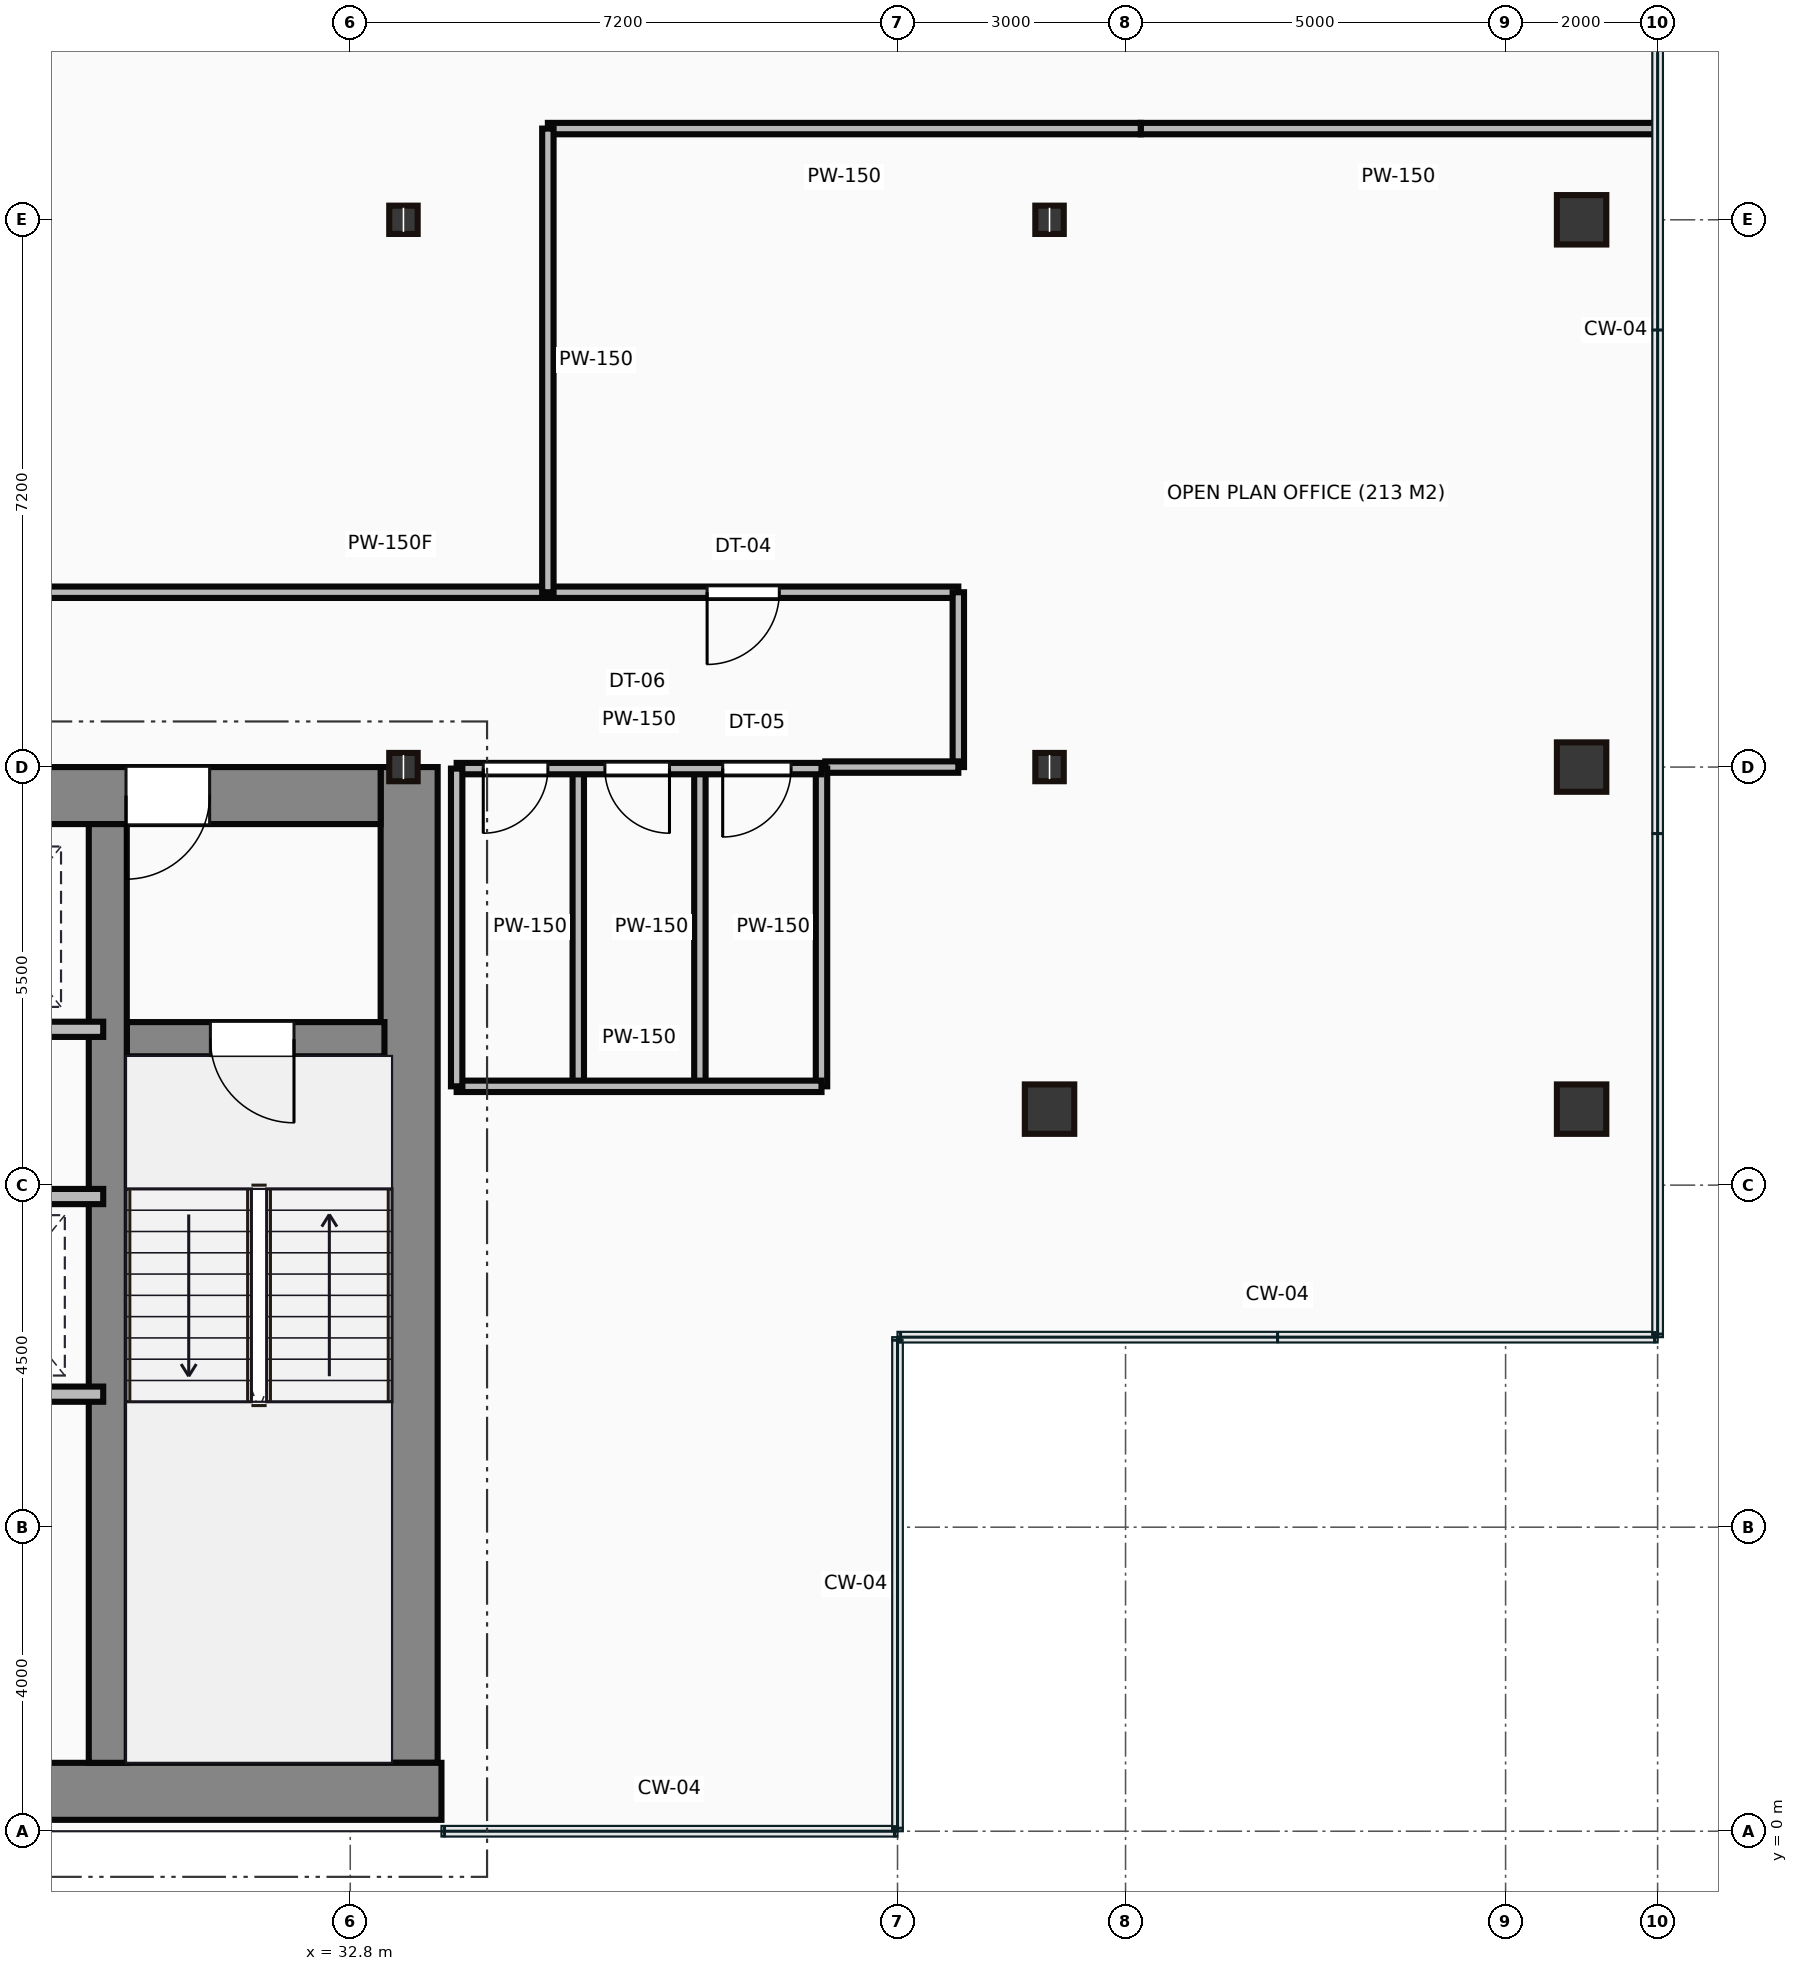
"""IFC4 building model, lengths in metres.
Left out: names, types, materials, properties, quantities, classifications, styles, units other than length and angle.
Written with IfcOpenShell. Run it as: python <this file> out.ifc"""

import sys

from ifc_helpers import new_model, si_unit, direction, frame, frame_2d, origin, origin_2d, place, context, subcontext, project, spatial, rectangle, hollow_rectangle, i_section, extrude, source, transform, mapped, element, fill, save


model = new_model("IFC4")
c1 = context("Model", 3, precision=1e-05, world=origin(), true_north=direction((0.0, 1.0)))
c2 = subcontext(c1, "Body", "Model", "MODEL_VIEW")
j1 = project(units=[si_unit("LENGTHUNIT", "METRE"), si_unit("PLANEANGLEUNIT", "RADIAN")], contexts=[c1])
p1 = place(None, origin())
s1 = spatial("IfcSite", under=j1, at=p1, CompositionType="ELEMENT")
p2 = place(p1, origin())
s2 = spatial("IfcBuilding", under=s1, at=p2, CompositionType="ELEMENT")
p3 = place(p2, frame((0.0, 0.0, 177.1)))
s3 = spatial("IfcBuildingStorey", under=s2, at=p3, CompositionType="ELEMENT", Elevation=177.1)
m1 = source(origin(), c2, "Body", "SweptSolid", [
    extrude(rectangle(XDim=29.5, YDim=0.75, at=frame_2d((14.75, 0.0))), origin(), (0.0, 0.0, 1.0), 3.65),
])
p4 = place(p3, frame((4.5, 0.525, 0.0), z_axis=(0.0, 0.0, 1.0), x_axis=(1.0, 0.0, 0.0)))
e1 = element("IfcWall", 1, at=p4, inside=s3, PredefinedType="SHEAR", context=c2, shape_type="MappedRepresentation", body=[
    mapped(m1, transform((0.0, 0.0, 0.0))),
])
m2 = source(origin(), c2, "Body", "SweptSolid", [
    extrude(rectangle(XDim=13.1, YDim=0.75, at=frame_2d((6.55, 0.0))), origin(), (0.0, 0.0, 1.0), 3.65),
])
p5 = place(p3, frame((33.575, 0.9, 0.0), z_axis=(0.0, 0.0, 1.0), x_axis=(0.0, 1.0, 0.0)))
e2 = element("IfcWall", 2, at=p5, inside=s3, PredefinedType="SHEAR", context=c2, shape_type="MappedRepresentation", body=[
    mapped(m2, transform((0.0, 0.0, 0.0))),
])
m3 = source(origin(), c2, "Body", "SweptSolid", [
    extrude(rectangle(XDim=12.6, YDim=0.75, at=frame_2d((6.3, 0.0))), origin(), (0.0, 0.0, 1.0), 3.65),
])
p6 = place(p3, frame((20.6, 13.625, 0.0), z_axis=(0.0, 0.0, 1.0), x_axis=(1.0, 0.0, 0.0)))
e3 = element("IfcWall", 3, at=p6, inside=s3, PredefinedType="SHEAR", context=c2, shape_type="MappedRepresentation", body=[
    mapped(m3, transform((0.0, 0.0, 0.0))),
])
p7 = place(p6, frame((9.25, 0.0, 0.0)))
e4 = element("IfcOpeningElement", 4, at=p7, cuts=e3, PredefinedType="OPENING", context=c2, shape_type="SweptSolid", body=[
    extrude(rectangle(XDim=1.1, YDim=2.15, at=frame_2d((0.55, 1.075))), frame((0.0, 0.385, 0.0), z_axis=(0.0, -1.0, 0.0), x_axis=(1.0, 0.0, 0.0)), (0.0, 0.0, 1.0), 0.77),
])
m4 = source(origin(), c2, "Body", "SweptSolid", [
    extrude(rectangle(XDim=12.35, YDim=0.5, at=frame_2d((6.175, 0.0))), origin(), (0.0, 0.0, 1.0), 3.65),
])
p8 = place(p3, frame((29.61, 0.9, 0.0), z_axis=(0.0, 0.0, 1.0), x_axis=(0.0, 1.0, 0.0)))
e5 = element("IfcWall", 5, at=p8, inside=s3, PredefinedType="SHEAR", context=c2, shape_type="MappedRepresentation", body=[
    mapped(m4, transform((0.0, 0.0, 0.0))),
])
m5 = source(origin(), c2, "Body", "SweptSolid", [
    extrude(rectangle(XDim=3.39, YDim=0.45, at=frame_2d((1.695, 0.0))), origin(), (0.0, 0.0, 1.0), 3.65),
])
p9 = place(p3, frame((29.86, 10.42, 0.0), z_axis=(0.0, 0.0, 1.0), x_axis=(1.0, 0.0, 0.0)))
e6 = element("IfcWall", 6, at=p9, inside=s3, PredefinedType="SHEAR", context=c2, shape_type="MappedRepresentation", body=[
    mapped(m5, transform((0.0, 0.0, 0.0))),
])
p10 = place(p9, frame((1.1, 0.0, 0.0)))
e7 = element("IfcOpeningElement", 7, at=p10, cuts=e6, PredefinedType="OPENING", context=c2, shape_type="SweptSolid", body=[
    extrude(rectangle(XDim=1.1, YDim=2.15, at=frame_2d((0.55, 1.075))), frame((0.0, 0.235, 0.0), z_axis=(0.0, -1.0, 0.0), x_axis=(1.0, 0.0, 0.0)), (0.0, 0.0, 1.0), 0.47),
])
m6 = source(origin(), c2, "Body", "SweptSolid", [
    extrude(i_section(OverallWidth=0.374, OverallDepth=0.372, WebThickness=0.016, FlangeThickness=0.026, at=origin_2d()), origin(), (0.0, 0.0, 1.0), 3.65),
])
for number, where, z_axis, x_axis in (
    (8, (33.5, 14.0, 0.0), (0.0, 0.0, 1.0), (1.0, 0.0, 0.0)),
    (9, (33.5, 21.2, 0.0), (0.0, 0.0, 1.0), (1.0, 0.0, 0.0)),
):
    element("IfcColumn", number, at=place(p3, frame(where, z_axis=z_axis, x_axis=x_axis)), inside=s3, PredefinedType="COLUMN", context=c2, shape_type="MappedRepresentation", body=[
        mapped(m6, transform((0.0, 0.0, 0.0))),
    ])
m7 = source(origin(), c2, "Body", "SweptSolid", [
    extrude(hollow_rectangle(XDim=0.65, YDim=0.65, WallThickness=0.032, at=origin_2d()), origin(), (0.0, 0.0, 1.0), 3.65),
])
p11 = place(p3, frame((42.0, 9.5, 0.0), z_axis=(0.0, 0.0, 1.0), x_axis=(1.0, 0.0, 0.0)))
e10 = element("IfcColumn", 10, at=p11, inside=s3, PredefinedType="COLUMN", context=c2, shape_type="MappedRepresentation", body=[
    mapped(m7, transform((0.0, 0.0, 0.0))),
])
for number, where, z_axis, x_axis in (
    (11, (42.0, 14.0, 0.0), (0.0, 0.0, 1.0), (1.0, 0.0, 0.0)),
    (12, (42.0, 21.2, 0.0), (0.0, 0.0, 1.0), (1.0, 0.0, 0.0)),
):
    element("IfcColumn", number, at=place(p3, frame(where, z_axis=z_axis, x_axis=x_axis)), inside=s3, PredefinedType="COLUMN", context=c2, shape_type="MappedRepresentation", body=[
        mapped(m6, transform((0.0, 0.0, 0.0))),
    ])
for number, where, z_axis, x_axis in (
    (13, (49.0, 9.5, 0.0), (0.0, 0.0, 1.0), (1.0, 0.0, 0.0)),
    (14, (49.0, 14.0, 0.0), (0.0, 0.0, 1.0), (1.0, 0.0, 0.0)),
    (15, (49.0, 21.2, 0.0), (0.0, 0.0, 1.0), (1.0, 0.0, 0.0)),
):
    element("IfcColumn", number, at=place(p3, frame(where, z_axis=z_axis, x_axis=x_axis)), inside=s3, PredefinedType="COLUMN", context=c2, shape_type="MappedRepresentation", body=[
        mapped(m7, transform((0.0, 0.0, 0.0))),
    ])
m8 = source(origin(), c2, "Body", "SweptSolid", [
    extrude(rectangle(XDim=8.8, YDim=0.2, at=frame_2d((4.4, 0.0))), origin(), (0.0, 0.0, 1.0), 3.4),
])
p12 = place(p3, frame((20.75, 10.55, 0.0), z_axis=(0.0, 0.0, 1.0), x_axis=(1.0, 0.0, 0.0)))
e16 = element("IfcWall", 16, at=p12, inside=s3, PredefinedType="PARTITIONING", context=c2, shape_type="MappedRepresentation", body=[
    mapped(m8, transform((0.0, 0.0, 0.0))),
])
m9 = source(origin(), c2, "Body", "SweptSolid", [
    extrude(rectangle(XDim=4.55, YDim=0.2, at=frame_2d((2.275, 0.0))), origin(), (0.0, 0.0, 1.0), 3.4),
])
for number, where, z_axis, x_axis in (
    (17, (25.0, 8.35, 0.0), (0.0, 0.0, 1.0), (1.0, 0.0, 0.0)),
    (18, (25.0, 5.75, 0.0), (0.0, 0.0, 1.0), (1.0, 0.0, 0.0)),
):
    element("IfcWall", number, at=place(p3, frame(where, z_axis=z_axis, x_axis=x_axis)), inside=s3, PredefinedType="PARTITIONING", context=c2, shape_type="MappedRepresentation", body=[
        mapped(m9, transform((0.0, 0.0, 0.0))),
    ])
m10 = source(origin(), c2, "Body", "SweptSolid", [
    extrude(rectangle(XDim=4.8, YDim=0.15, at=frame_2d((2.4, 0.0))), origin(), (0.0, 0.0, 1.0), 2.76),
])
p13 = place(p3, frame((34.2, 13.98, 0.0), z_axis=(0.0, 0.0, 1.0), x_axis=(1.0, 0.0, 0.0)))
e19 = element("IfcWall", 19, at=p13, inside=s3, PredefinedType="PARTITIONING", context=c2, shape_type="MappedRepresentation", body=[
    mapped(m10, transform((0.0, 0.0, 0.0))),
])
p14 = place(p13, frame((0.35, 0.0, 0.0)))
e20 = element("IfcOpeningElement", 20, at=p14, cuts=e19, PredefinedType="OPENING", context=c2, shape_type="SweptSolid", body=[
    extrude(rectangle(XDim=0.85, YDim=2.1, at=frame_2d((0.425, 1.05))), frame((0.0, 0.085, 0.0), z_axis=(0.0, -1.0, 0.0), x_axis=(1.0, 0.0, 0.0)), (0.0, 0.0, 1.0), 0.17),
])
p15 = place(p13, frame((1.95, 0.0, 0.0)))
e21 = element("IfcOpeningElement", 21, at=p15, cuts=e19, PredefinedType="OPENING", context=c2, shape_type="SweptSolid", body=[
    extrude(rectangle(XDim=0.85, YDim=2.1, at=frame_2d((0.425, 1.05))), frame((0.0, 0.085, 0.0), z_axis=(0.0, -1.0, 0.0), x_axis=(1.0, 0.0, 0.0)), (0.0, 0.0, 1.0), 0.17),
])
p16 = place(p13, frame((3.5, 0.0, 0.0)))
e22 = element("IfcOpeningElement", 22, at=p16, cuts=e19, PredefinedType="OPENING", context=c2, shape_type="SweptSolid", body=[
    extrude(rectangle(XDim=0.9, YDim=2.1, at=frame_2d((0.45, 1.05))), frame((0.0, 0.085, 0.0), z_axis=(0.0, -1.0, 0.0), x_axis=(1.0, 0.0, 0.0)), (0.0, 0.0, 1.0), 0.17),
])
m11 = source(origin(), c2, "Body", "SweptSolid", [
    extrude(rectangle(XDim=4.8, YDim=0.15, at=frame_2d((2.4, 0.0))), origin(), (0.0, 0.0, 1.0), 3.4),
])
p17 = place(p3, frame((34.2, 9.8, 0.0), z_axis=(0.0, 0.0, 1.0), x_axis=(1.0, 0.0, 0.0)))
e23 = element("IfcWall", 23, at=p17, inside=s3, PredefinedType="PARTITIONING", context=c2, shape_type="MappedRepresentation", body=[
    mapped(m11, transform((0.0, 0.0, 0.0))),
])
m12 = source(origin(), c2, "Body", "SweptSolid", [
    extrude(rectangle(XDim=4.18, YDim=0.15, at=frame_2d((2.09, 0.0))), origin(), (0.0, 0.0, 1.0), 3.4),
])
for number, where, z_axis, x_axis in (
    (24, (39.0, 9.8, 0.0), (0.0, 0.0, 1.0), (0.0, 1.0, 0.0)),
    (25, (34.2, 9.8, 0.0), (0.0, 0.0, 1.0), (0.0, 1.0, 0.0)),
    (26, (35.8, 9.8, 0.0), (0.0, 0.0, 1.0), (0.0, 1.0, 0.0)),
    (27, (37.4, 9.8, 0.0), (0.0, 0.0, 1.0), (0.0, 1.0, 0.0)),
):
    element("IfcWall", number, at=place(p3, frame(where, z_axis=z_axis, x_axis=x_axis)), inside=s3, PredefinedType="PARTITIONING", context=c2, shape_type="MappedRepresentation", body=[
        mapped(m12, transform((0.0, 0.0, 0.0))),
    ])
m13 = source(origin(), c2, "Body", "SweptSolid", [
    extrude(rectangle(XDim=14.95, YDim=0.15, at=frame_2d((7.475, 0.0))), origin(), (0.0, 0.0, 1.0), 3.4),
])
p18 = place(p3, frame((25.85, 16.3, 0.0), z_axis=(0.0, 0.0, 1.0), x_axis=(1.0, 0.0, 0.0)))
e28 = element("IfcWall", 28, at=p18, inside=s3, PredefinedType="PARTITIONING", context=c2, shape_type="MappedRepresentation", body=[
    mapped(m13, transform((0.0, 0.0, 0.0))),
])
p19 = place(p18, frame((11.645, 0.0, 0.0)))
e29 = element("IfcOpeningElement", 29, at=p19, cuts=e28, PredefinedType="OPENING", context=c2, shape_type="SweptSolid", body=[
    extrude(rectangle(XDim=0.95, YDim=2.15, at=frame_2d((0.475, 1.075))), frame((0.0, 0.085, 0.0), z_axis=(0.0, -1.0, 0.0), x_axis=(1.0, 0.0, 0.0)), (0.0, 0.0, 1.0), 0.17),
])
m14 = source(origin(), c2, "Body", "SweptSolid", [
    extrude(rectangle(XDim=2.3, YDim=0.15, at=frame_2d((1.15, 0.0))), origin(), (0.0, 0.0, 1.0), 3.4),
])
p20 = place(p3, frame((40.8, 16.3, 0.0), z_axis=(0.0, 0.0, 1.0), x_axis=(0.0, -1.0, 0.0)))
e30 = element("IfcWall", 30, at=p20, inside=s3, PredefinedType="PARTITIONING", context=c2, shape_type="MappedRepresentation", body=[
    mapped(m14, transform((0.0, 0.0, 0.0))),
])
m15 = source(origin(), c2, "Body", "SweptSolid", [
    extrude(rectangle(XDim=1.75, YDim=0.15, at=frame_2d((0.875, 0.0))), origin(), (0.0, 0.0, 1.0), 2.76),
])
p21 = place(p3, frame((40.8, 14.0, 0.0), z_axis=(0.0, 0.0, 1.0), x_axis=(-1.0, 0.0, 0.0)))
e31 = element("IfcWall", 31, at=p21, inside=s3, PredefinedType="PARTITIONING", context=c2, shape_type="MappedRepresentation", body=[
    mapped(m15, transform((0.0, 0.0, 0.0))),
])
m16 = source(origin(), c2, "Body", "SweptSolid", [
    extrude(rectangle(XDim=6.78, YDim=0.15, at=frame_2d((3.39, 0.0))), origin(), (0.0, 0.0, 1.0), 3.4),
])
p22 = place(p3, frame((49.98, 22.4, 0.0), z_axis=(0.0, 0.0, 1.0), x_axis=(-1.0, 0.0, 0.0)))
e32 = element("IfcWall", 32, at=p22, inside=s3, PredefinedType="PARTITIONING", context=c2, shape_type="MappedRepresentation", body=[
    mapped(m16, transform((0.0, 0.0, 0.0))),
])
m17 = source(origin(), c2, "Body", "SweptSolid", [
    extrude(rectangle(XDim=7.8, YDim=0.15, at=frame_2d((3.9, 0.0))), origin(), (0.0, 0.0, 1.0), 3.4),
])
p23 = place(p3, frame((43.2, 22.4, 0.0), z_axis=(0.0, 0.0, 1.0), x_axis=(-1.0, 0.0, 0.0)))
e33 = element("IfcWall", 33, at=p23, inside=s3, PredefinedType="PARTITIONING", context=c2, shape_type="MappedRepresentation", body=[
    mapped(m17, transform((0.0, 0.0, 0.0))),
])
m18 = source(origin(), c2, "Body", "SweptSolid", [
    extrude(rectangle(XDim=6.1, YDim=0.15, at=frame_2d((3.05, 0.0))), origin(), (0.0, 0.0, 1.0), 3.4),
])
p24 = place(p3, frame((35.4, 22.4, 0.0), z_axis=(0.0, 0.0, 1.0), x_axis=(0.0, -1.0, 0.0)))
e34 = element("IfcWall", 34, at=p24, inside=s3, PredefinedType="PARTITIONING", context=c2, shape_type="MappedRepresentation", body=[
    mapped(m18, transform((0.0, 0.0, 0.0))),
])
m19 = source(origin(), c2, "Body", "SweptSolid", [
    extrude(rectangle(XDim=1.1, YDim=2.15, at=frame_2d((0.55, 1.075))), frame((0.0, 0.025, 0.0), z_axis=(0.0, -1.0, 0.0), x_axis=(1.0, 0.0, 0.0)), (0.0, 0.0, 1.0), 0.05),
])
p25 = place(p10, frame((1.1, 0.0, 0.0), z_axis=(0.0, 0.0, 1.0), x_axis=(-1.0, 0.0, 0.0)))
e35 = element("IfcDoor", 35, at=p25, inside=s3, OperationType="SINGLE_SWING_RIGHT", PredefinedType="DOOR", context=c2, shape_type="MappedRepresentation", body=[
    mapped(m19, transform((0.0, 0.0, 0.0))),
])
fill(e7, e35)
p26 = place(p7, origin())
e36 = element("IfcDoor", 36, at=p26, inside=s3, OperationType="SINGLE_SWING_LEFT", PredefinedType="DOOR", context=c2, shape_type="MappedRepresentation", body=[
    mapped(m19, transform((0.0, 0.0, 0.0))),
])
fill(e4, e36)
m20 = source(origin(), c2, "Body", "SweptSolid", [
    extrude(rectangle(XDim=0.85, YDim=2.1, at=frame_2d((0.425, 1.05))), frame((0.0, 0.025, 0.0), z_axis=(0.0, -1.0, 0.0), x_axis=(1.0, 0.0, 0.0)), (0.0, 0.0, 1.0), 0.05),
])
p27 = place(p14, frame((0.85, 0.0, 0.0), z_axis=(0.0, 0.0, 1.0), x_axis=(-1.0, 0.0, 0.0)))
e37 = element("IfcDoor", 37, at=p27, inside=s3, OperationType="SINGLE_SWING_LEFT", PredefinedType="DOOR", context=c2, shape_type="MappedRepresentation", body=[
    mapped(m20, transform((0.0, 0.0, 0.0))),
])
fill(e20, e37)
p28 = place(p15, frame((0.85, 0.0, 0.0), z_axis=(0.0, 0.0, 1.0), x_axis=(-1.0, 0.0, 0.0)))
e38 = element("IfcDoor", 38, at=p28, inside=s3, OperationType="SINGLE_SWING_RIGHT", PredefinedType="DOOR", context=c2, shape_type="MappedRepresentation", body=[
    mapped(m20, transform((0.0, 0.0, 0.0))),
])
fill(e21, e38)
m21 = source(origin(), c2, "Body", "SweptSolid", [
    extrude(rectangle(XDim=0.9, YDim=2.1, at=frame_2d((0.45, 1.05))), frame((0.0, 0.025, 0.0), z_axis=(0.0, -1.0, 0.0), x_axis=(1.0, 0.0, 0.0)), (0.0, 0.0, 1.0), 0.05),
])
p29 = place(p16, frame((0.9, 0.0, 0.0), z_axis=(0.0, 0.0, 1.0), x_axis=(-1.0, 0.0, 0.0)))
e39 = element("IfcDoor", 39, at=p29, inside=s3, OperationType="SINGLE_SWING_LEFT", PredefinedType="DOOR", context=c2, shape_type="MappedRepresentation", body=[
    mapped(m21, transform((0.0, 0.0, 0.0))),
])
fill(e22, e39)
m22 = source(origin(), c2, "Body", "SweptSolid", [
    extrude(rectangle(XDim=0.95, YDim=2.15, at=frame_2d((0.475, 1.075))), frame((0.0, 0.025, 0.0), z_axis=(0.0, -1.0, 0.0), x_axis=(1.0, 0.0, 0.0)), (0.0, 0.0, 1.0), 0.05),
])
p30 = place(p19, origin())
e40 = element("IfcDoor", 40, at=p30, inside=s3, OperationType="SINGLE_SWING_LEFT", PredefinedType="DOOR", context=c2, shape_type="MappedRepresentation", body=[
    mapped(m22, transform((0.0, 0.0, 0.0))),
])
fill(e29, e40)
save(model, sys.argv[1])
